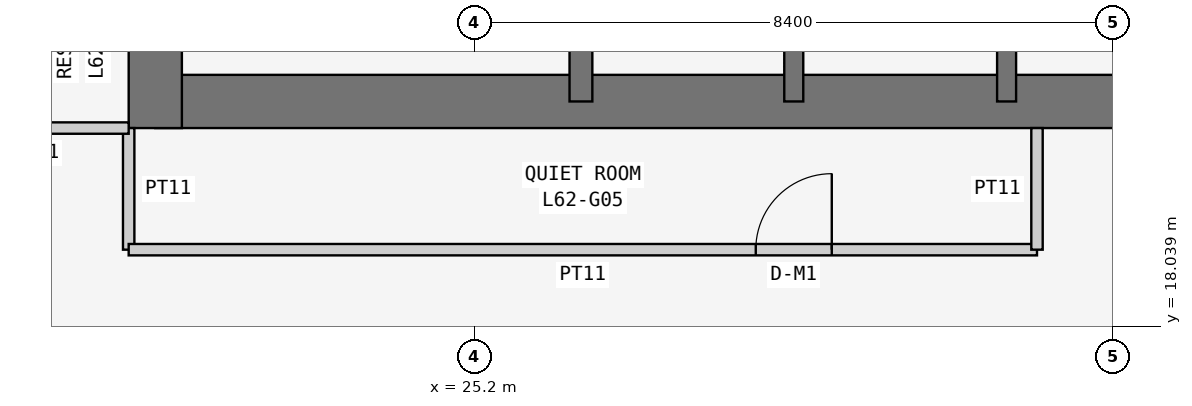
"""IFC4 building model, lengths in metres.
Left out: names, types, materials, properties, quantities, classifications, styles, units other than length and angle.
Written with IfcOpenShell. Run it as: python <this file> out.ifc"""

import sys

from ifc_helpers import new_model, si_unit, direction, frame, frame_2d, origin, place, context, subcontext, project, spatial, rectangle, extrude, element, fill, save


model = new_model("IFC4")
c1 = context("Model", 3, precision=1e-05, world=origin(), true_north=direction((0.0, 1.0)))
c2 = subcontext(c1, "Body", "Model", "MODEL_VIEW")
j1 = project(units=[si_unit("LENGTHUNIT", "METRE"), si_unit("PLANEANGLEUNIT", "RADIAN")], contexts=[c1])
p1 = place(None, origin())
s1 = spatial("IfcSite", under=j1, at=p1, CompositionType="ELEMENT")
p2 = place(p1, origin())
s2 = spatial("IfcBuilding", under=s1, at=p2, CompositionType="ELEMENT")
p3 = place(p2, frame((0.0, 0.0, 237.3)))
s3 = spatial("IfcBuildingStorey", under=s2, at=p3, CompositionType="ELEMENT", Elevation=237.3)
p4 = place(p3, frame((21.0, 21.0, 0.0), z_axis=(0.0, 0.0, 1.0), x_axis=(1.0, 0.0, 0.0)))
e1 = element("IfcWall", 1, at=p4, inside=s3, PredefinedType="SHEAR", context=c2, shape_type="SweptSolid", body=[
    extrude(rectangle(XDim=17.15, YDim=0.7, at=frame_2d((8.575, 0.0))), origin(), (0.0, 0.0, 1.0), 3.6),
])
p5 = place(p3, frame((21.0, 37.8, 0.0), z_axis=(0.0, 0.0, 1.0), x_axis=(0.0, -1.0, 0.0)))
e2 = element("IfcWall", 2, at=p5, inside=s3, PredefinedType="SHEAR", context=c2, shape_type="SweptSolid", body=[
    extrude(rectangle(XDim=17.15, YDim=0.7, at=frame_2d((8.575, 0.0))), origin(), (0.0, 0.0, 1.0), 3.6),
])
p6 = place(p5, frame((5.4, 0.0, 0.0)))
e3 = element("IfcOpeningElement", 3, at=p6, cuts=e2, PredefinedType="OPENING", context=c2, shape_type="SweptSolid", body=[
    extrude(rectangle(XDim=1.2, YDim=2.1, at=frame_2d((0.6, 1.05))), frame((0.0, 0.36, 0.0), z_axis=(0.0, -1.0, 0.0), x_axis=(1.0, 0.0, 0.0)), (0.0, 0.0, 1.0), 0.72),
])
p7 = place(p3, frame((26.6, 21.0, 0.0), z_axis=(0.0, 0.0, 1.0), x_axis=(0.0, 1.0, 0.0)))
e4 = element("IfcWall", 4, at=p7, inside=s3, PredefinedType="SHEAR", context=c2, shape_type="SweptSolid", body=[
    extrude(rectangle(XDim=16.8, YDim=0.3, at=frame_2d((8.4, 0.0))), origin(), (0.0, 0.0, 1.0), 3.6),
])
p8 = place(p7, frame((10.4, 0.0, 0.0)))
e5 = element("IfcOpeningElement", 5, at=p8, cuts=e4, PredefinedType="OPENING", context=c2, shape_type="SweptSolid", body=[
    extrude(rectangle(XDim=1.2, YDim=2.1, at=frame_2d((0.6, 1.05))), frame((0.0, 0.16, 0.0), z_axis=(0.0, -1.0, 0.0), x_axis=(1.0, 0.0, 0.0)), (0.0, 0.0, 1.0), 0.32),
])
for number, where, z_axis, x_axis in (
    (6, (29.4, 21.0, 0.0), (0.0, 0.0, 1.0), (0.0, 1.0, 0.0)),
    (7, (32.2, 21.0, 0.0), (0.0, 0.0, 1.0), (0.0, 1.0, 0.0)),
):
    element("IfcWall", number, at=place(p3, frame(where, z_axis=z_axis, x_axis=x_axis)), inside=s3, PredefinedType="SHEAR", context=c2, shape_type="SweptSolid", body=[
        extrude(rectangle(XDim=3.2, YDim=0.25, at=frame_2d((1.6, 0.0))), origin(), (0.0, 0.0, 1.0), 3.6),
    ])
p9 = place(p3, frame((20.65, 20.65, 0.0), z_axis=(0.0, 0.0, 1.0), x_axis=(0.0, -1.0, 0.0)))
e8 = element("IfcWall", 8, at=p9, inside=s3, PredefinedType="PARTITIONING", context=c2, shape_type="SweptSolid", body=[
    extrude(rectangle(XDim=1.6, YDim=0.15, at=frame_2d((0.8, 0.0))), origin(), (0.0, 0.0, 1.0), 3.45),
])
p10 = place(p3, frame((20.65, 19.05, 0.0), z_axis=(0.0, 0.0, 1.0), x_axis=(1.0, 0.0, 0.0)))
e9 = element("IfcWall", 9, at=p10, inside=s3, PredefinedType="PARTITIONING", context=c2, shape_type="SweptSolid", body=[
    extrude(rectangle(XDim=11.95, YDim=0.15, at=frame_2d((5.975, 0.0))), origin(), (0.0, 0.0, 1.0), 3.45),
])
p11 = place(p10, frame((8.25, 0.0, 0.0)))
e10 = element("IfcOpeningElement", 10, at=p11, cuts=e9, PredefinedType="OPENING", context=c2, shape_type="SweptSolid", body=[
    extrude(rectangle(XDim=1.0, YDim=2.1, at=frame_2d((0.5, 1.05))), frame((0.0, 0.085, 0.0), z_axis=(0.0, -1.0, 0.0), x_axis=(1.0, 0.0, 0.0)), (0.0, 0.0, 1.0), 0.17),
])
p12 = place(p3, frame((32.6, 19.05, 0.0), z_axis=(0.0, 0.0, 1.0), x_axis=(0.0, 1.0, 0.0)))
e11 = element("IfcWall", 11, at=p12, inside=s3, PredefinedType="PARTITIONING", context=c2, shape_type="SweptSolid", body=[
    extrude(rectangle(XDim=1.6, YDim=0.15, at=frame_2d((0.8, 0.0))), origin(), (0.0, 0.0, 1.0), 3.45),
])
p13 = place(p3, frame((18.2, 20.65, 0.0), z_axis=(0.0, 0.0, 1.0), x_axis=(1.0, 0.0, 0.0)))
e12 = element("IfcWall", 12, at=p13, inside=s3, PredefinedType="PARTITIONING", context=c2, shape_type="SweptSolid", body=[
    extrude(rectangle(XDim=2.45, YDim=0.15, at=frame_2d((1.225, 0.0))), origin(), (0.0, 0.0, 1.0), 3.45),
])
p14 = place(p11, origin())
e13 = element("IfcDoor", 13, at=p14, inside=s3, OperationType="SINGLE_SWING_RIGHT", PredefinedType="DOOR", context=c2, shape_type="SweptSolid", body=[
    extrude(rectangle(XDim=1.0, YDim=2.1, at=frame_2d((0.5, 1.05))), frame((0.0, 0.025, 0.0), z_axis=(0.0, -1.0, 0.0), x_axis=(1.0, 0.0, 0.0)), (0.0, 0.0, 1.0), 0.05),
])
fill(e10, e13)
save(model, sys.argv[1])
